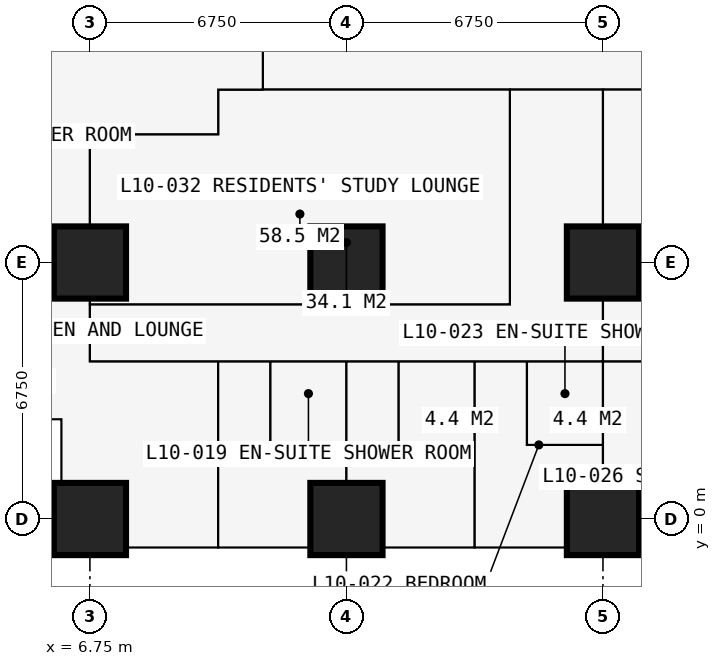
"""IFC4 building model, lengths in metres.
Left out: names, types, materials, properties, quantities, classifications, styles, units other than length and angle.
Written with IfcOpenShell. Run it as: python <this file> out.ifc"""

import sys

from ifc_helpers import new_model, si_unit, direction, frame, frame_2d, origin, origin_2d, place, context, subcontext, project, spatial, rectangle, extrude, element, fill, save


model = new_model("IFC4")
c1 = context("Model", 3, precision=1e-05, world=origin(), true_north=direction((0.0, 1.0)))
c2 = subcontext(c1, "Body", "Model", "MODEL_VIEW")
j1 = project(units=[si_unit("LENGTHUNIT", "METRE"), si_unit("PLANEANGLEUNIT", "RADIAN")], contexts=[c1])
p1 = place(None, origin())
s1 = spatial("IfcSite", under=j1, at=p1, CompositionType="ELEMENT")
p2 = place(p1, origin())
s2 = spatial("IfcBuilding", under=s1, at=p2, CompositionType="ELEMENT")
p3 = place(p2, frame((0.0, 0.0, 39.6)))
s3 = spatial("IfcBuildingStorey", under=s2, at=p3, CompositionType="ELEMENT", Elevation=39.6)
for number, where, z_axis, x_axis in (
    (1, (6.75, 0.0, 0.0), (0.0, 0.0, 1.0), (1.0, 0.0, 0.0)),
    (2, (6.75, 6.75, 0.0), (0.0, 0.0, 1.0), (1.0, 0.0, 0.0)),
    (3, (13.5, 0.0, 0.0), (0.0, 0.0, 1.0), (1.0, 0.0, 0.0)),
    (4, (13.5, 6.75, 0.0), (0.0, 0.0, 1.0), (1.0, 0.0, 0.0)),
    (5, (20.25, 0.0, 0.0), (0.0, 0.0, 1.0), (1.0, 0.0, 0.0)),
    (6, (20.25, 6.75, 0.0), (0.0, 0.0, 1.0), (1.0, 0.0, 0.0)),
):
    element("IfcColumn", number, at=place(p3, frame(where, z_axis=z_axis, x_axis=x_axis)), inside=s3, PredefinedType="COLUMN", context=c2, shape_type="SweptSolid", body=[
        extrude(rectangle(XDim=1.9, YDim=1.9, at=origin_2d()), origin(), (0.0, 0.0, 1.0), 3.6),
    ])
p4 = place(p3, frame((2.625, 2.625, 0.0), z_axis=(0.0, 0.0, 1.0), x_axis=(1.0, 0.0, 0.0)))
e7 = element("IfcWall", 7, at=p4, inside=s3, PredefinedType="SOLIDWALL", context=c2, shape_type="SweptSolid", body=[
    extrude(rectangle(XDim=3.375, YDim=0.3, at=frame_2d((1.688, 0.0))), origin(), (0.0, 0.0, 1.0), 3.375),
])
p5 = place(p4, frame((0.788, 0.0, 0.6)))
e8 = element("IfcOpeningElement", 8, at=p5, cuts=e7, PredefinedType="OPENING", context=c2, shape_type="SweptSolid", body=[
    extrude(rectangle(XDim=1.8, YDim=2.1, at=frame_2d((0.9, 1.05))), frame((0.0, 0.16, 0.0), z_axis=(0.0, -1.0, 0.0), x_axis=(1.0, 0.0, 0.0)), (0.0, 0.0, 1.0), 0.32),
])
p6 = place(p3, frame((6.0, 2.625, 0.0), z_axis=(0.0, 0.0, 1.0), x_axis=(0.0, -1.0, 0.0)))
e9 = element("IfcWall", 9, at=p6, inside=s3, PredefinedType="SOLIDWALL", context=c2, shape_type="SweptSolid", body=[
    extrude(rectangle(XDim=3.375, YDim=0.3, at=frame_2d((1.688, 0.0))), origin(), (0.0, 0.0, 1.0), 3.375),
])
p7 = place(p6, frame((0.317, 0.0, 0.9)))
e10 = element("IfcOpeningElement", 10, at=p7, cuts=e9, PredefinedType="OPENING", context=c2, shape_type="SweptSolid", body=[
    extrude(rectangle(XDim=1.2, YDim=1.8, at=frame_2d((0.6, 0.9))), frame((0.0, 0.16, 0.0), z_axis=(0.0, -1.0, 0.0), x_axis=(1.0, 0.0, 0.0)), (0.0, 0.0, 1.0), 0.32),
])
p8 = place(p3, frame((20.25, -0.75, 0.0), z_axis=(0.0, 0.0, 1.0), x_axis=(-1.0, 0.0, 0.0)))
e11 = element("IfcWall", 11, at=p8, inside=s3, PredefinedType="SOLIDWALL", context=c2, shape_type="SweptSolid", body=[
    extrude(rectangle(XDim=6.75, YDim=0.15, at=frame_2d((3.375, 0.0))), origin(), (0.0, 0.0, 1.0), 3.375),
])
p9 = place(p8, frame((0.996, 0.0, 0.0)))
e12 = element("IfcOpeningElement", 12, at=p9, cuts=e11, PredefinedType="OPENING", context=c2, shape_type="SweptSolid", body=[
    extrude(rectangle(XDim=1.0, YDim=2.2, at=frame_2d((0.5, 1.1))), frame((0.0, 0.085, 0.0), z_axis=(0.0, -1.0, 0.0), x_axis=(1.0, 0.0, 0.0)), (0.0, 0.0, 1.0), 0.17),
])
p10 = place(p8, frame((2.042, 0.0, 0.9)))
e13 = element("IfcOpeningElement", 13, at=p10, cuts=e11, PredefinedType="OPENING", context=c2, shape_type="SweptSolid", body=[
    extrude(rectangle(XDim=1.2, YDim=1.8, at=frame_2d((0.6, 0.9))), frame((0.0, 0.085, 0.0), z_axis=(0.0, -1.0, 0.0), x_axis=(1.0, 0.0, 0.0)), (0.0, 0.0, 1.0), 0.17),
])
p11 = place(p8, frame((4.754, 0.0, 0.0)))
e14 = element("IfcOpeningElement", 14, at=p11, cuts=e11, PredefinedType="OPENING", context=c2, shape_type="SweptSolid", body=[
    extrude(rectangle(XDim=1.0, YDim=2.2, at=frame_2d((0.5, 1.1))), frame((0.0, 0.085, 0.0), z_axis=(0.0, -1.0, 0.0), x_axis=(1.0, 0.0, 0.0)), (0.0, 0.0, 1.0), 0.17),
])
p12 = place(p8, frame((3.508, 0.0, 0.9)))
e15 = element("IfcOpeningElement", 15, at=p12, cuts=e11, PredefinedType="OPENING", context=c2, shape_type="SweptSolid", body=[
    extrude(rectangle(XDim=1.2, YDim=1.8, at=frame_2d((0.6, 0.9))), frame((0.0, 0.085, 0.0), z_axis=(0.0, -1.0, 0.0), x_axis=(1.0, 0.0, 0.0)), (0.0, 0.0, 1.0), 0.17),
])
p13 = place(p3, frame((16.875, -0.85, 0.0), z_axis=(0.0, 0.0, 1.0), x_axis=(0.0, -1.0, 0.0)))
e16 = element("IfcWall", 16, at=p13, inside=s3, PredefinedType="USERDEFINED", context=c2, shape_type="SweptSolid", body=[
    extrude(rectangle(XDim=2.2, YDim=1.0, at=frame_2d((1.1, 0.0))), origin(), (0.0, 0.0, 1.0), 0.9),
])
p14 = place(p3, frame((-0.734, 10.125, 0.0), z_axis=(0.0, 0.0, 1.0), x_axis=(1.0, 0.0, 0.0)))
e17 = element("IfcWall", 17, at=p14, inside=s3, PredefinedType="PARTITIONING", context=c2, shape_type="SweptSolid", body=[
    extrude(rectangle(XDim=10.859, YDim=0.15, at=frame_2d((5.429, 0.0))), origin(), (0.0, 0.0, 1.0), 3.375),
])
p15 = place(p3, frame((6.75, 4.15, 0.0), z_axis=(0.0, 0.0, 1.0), x_axis=(0.0, 1.0, 0.0)))
e18 = element("IfcWall", 18, at=p15, inside=s3, PredefinedType="PARTITIONING", context=c2, shape_type="SweptSolid", body=[
    extrude(rectangle(XDim=5.975, YDim=0.15, at=frame_2d((2.988, 0.0))), origin(), (0.0, 0.0, 1.0), 2.877),
])
p16 = place(p3, frame((6.75, 4.15, 0.0), z_axis=(0.0, 0.0, 1.0), x_axis=(1.0, 0.0, 0.0)))
e19 = element("IfcWall", 19, at=p16, inside=s3, PredefinedType="PARTITIONING", context=c2, shape_type="SweptSolid", body=[
    extrude(rectangle(XDim=23.625, YDim=0.1, at=frame_2d((11.812, 0.0))), origin(), (0.0, 0.0, 1.0), 3.375),
])
p17 = place(p16, frame((1.2, 0.0, 0.0)))
e20 = element("IfcOpeningElement", 20, at=p17, cuts=e19, PredefinedType="OPENING", context=c2, shape_type="SweptSolid", body=[
    extrude(rectangle(XDim=1.0, YDim=2.2, at=frame_2d((0.5, 1.1))), frame((0.0, 0.06, 0.0), z_axis=(0.0, -1.0, 0.0), x_axis=(1.0, 0.0, 0.0)), (0.0, 0.0, 1.0), 0.12),
])
p18 = place(p16, frame((3.575, 0.0, 0.0)))
e21 = element("IfcOpeningElement", 21, at=p18, cuts=e19, PredefinedType="OPENING", context=c2, shape_type="SweptSolid", body=[
    extrude(rectangle(XDim=0.95, YDim=2.2, at=frame_2d((0.475, 1.1))), frame((0.0, 0.06, 0.0), z_axis=(0.0, -1.0, 0.0), x_axis=(1.0, 0.0, 0.0)), (0.0, 0.0, 1.0), 0.12),
])
p19 = place(p16, frame((7.0, 0.0, 0.0)))
e22 = element("IfcOpeningElement", 22, at=p19, cuts=e19, PredefinedType="OPENING", context=c2, shape_type="SweptSolid", body=[
    extrude(rectangle(XDim=0.95, YDim=2.2, at=frame_2d((0.475, 1.1))), frame((0.0, 0.06, 0.0), z_axis=(0.0, -1.0, 0.0), x_axis=(1.0, 0.0, 0.0)), (0.0, 0.0, 1.0), 0.12),
])
p20 = place(p16, frame((10.375, 0.0, 0.0)))
e23 = element("IfcOpeningElement", 23, at=p20, cuts=e19, PredefinedType="OPENING", context=c2, shape_type="SweptSolid", body=[
    extrude(rectangle(XDim=0.95, YDim=2.2, at=frame_2d((0.475, 1.1))), frame((0.0, 0.06, 0.0), z_axis=(0.0, -1.0, 0.0), x_axis=(1.0, 0.0, 0.0)), (0.0, 0.0, 1.0), 0.12),
])
p21 = place(p16, frame((13.7, 0.0, 0.0)))
e24 = element("IfcOpeningElement", 24, at=p21, cuts=e19, PredefinedType="OPENING", context=c2, shape_type="SweptSolid", body=[
    extrude(rectangle(XDim=0.95, YDim=2.2, at=frame_2d((0.475, 1.1))), frame((0.0, 0.06, 0.0), z_axis=(0.0, -1.0, 0.0), x_axis=(1.0, 0.0, 0.0)), (0.0, 0.0, 1.0), 0.12),
])
p22 = place(p16, frame((17.125, 0.0, 0.0)))
e25 = element("IfcOpeningElement", 25, at=p22, cuts=e19, PredefinedType="OPENING", context=c2, shape_type="SweptSolid", body=[
    extrude(rectangle(XDim=0.95, YDim=2.2, at=frame_2d((0.475, 1.1))), frame((0.0, 0.06, 0.0), z_axis=(0.0, -1.0, 0.0), x_axis=(1.0, 0.0, 0.0)), (0.0, 0.0, 1.0), 0.12),
])
p23 = place(p16, frame((20.5, 0.0, 0.0)))
e26 = element("IfcOpeningElement", 26, at=p23, cuts=e19, PredefinedType="OPENING", context=c2, shape_type="SweptSolid", body=[
    extrude(rectangle(XDim=0.95, YDim=2.2, at=frame_2d((0.475, 1.1))), frame((0.0, 0.06, 0.0), z_axis=(0.0, -1.0, 0.0), x_axis=(1.0, 0.0, 0.0)), (0.0, 0.0, 1.0), 0.12),
])
p24 = place(p3, frame((6.75, 5.65, 0.0), z_axis=(0.0, 0.0, 1.0), x_axis=(1.0, 0.0, 0.0)))
e27 = element("IfcWall", 27, at=p24, inside=s3, PredefinedType="PARTITIONING", context=c2, shape_type="SweptSolid", body=[
    extrude(rectangle(XDim=11.05, YDim=0.15, at=frame_2d((5.525, 0.0))), origin(), (0.0, 0.0, 1.0), 3.375),
])
p25 = place(p3, frame((10.125, -0.734, 0.0), z_axis=(0.0, 0.0, 1.0), x_axis=(0.0, 1.0, 0.0)))
e28 = element("IfcWall", 28, at=p25, inside=s3, PredefinedType="PARTITIONING", context=c2, shape_type="SweptSolid", body=[
    extrude(rectangle(XDim=4.884, YDim=0.15, at=frame_2d((2.442, 0.0))), origin(), (0.0, 0.0, 1.0), 3.375),
])
p26 = place(p3, frame((10.125, 10.125, 0.0), z_axis=(0.0, 0.0, 1.0), x_axis=(0.0, 1.0, 0.0)))
e29 = element("IfcWall", 29, at=p26, inside=s3, PredefinedType="PARTITIONING", context=c2, shape_type="SweptSolid", body=[
    extrude(rectangle(XDim=1.175, YDim=0.15, at=frame_2d((0.587, 0.0))), origin(), (0.0, 0.0, 1.0), 3.375),
])
p27 = place(p3, frame((10.125, 11.3, 0.0), z_axis=(0.0, 0.0, 1.0), x_axis=(1.0, 0.0, 0.0)))
e30 = element("IfcWall", 30, at=p27, inside=s3, PredefinedType="PARTITIONING", context=c2, shape_type="SweptSolid", body=[
    extrude(rectangle(XDim=20.675, YDim=0.15, at=frame_2d((10.337, 0.0))), origin(), (0.0, 0.0, 1.0), 3.375),
])
p28 = place(p27, frame((8.375, 0.0, 0.0)))
e31 = element("IfcOpeningElement", 31, at=p28, cuts=e30, PredefinedType="OPENING", context=c2, shape_type="SweptSolid", body=[
    extrude(rectangle(XDim=1.0, YDim=2.2, at=frame_2d((0.5, 1.1))), frame((0.0, 0.085, 0.0), z_axis=(0.0, -1.0, 0.0), x_axis=(1.0, 0.0, 0.0)), (0.0, 0.0, 1.0), 0.17),
])
p29 = place(p27, frame((10.975, 0.0, 0.0)))
e32 = element("IfcOpeningElement", 32, at=p29, cuts=e30, PredefinedType="OPENING", context=c2, shape_type="SweptSolid", body=[
    extrude(rectangle(XDim=1.0, YDim=2.2, at=frame_2d((0.5, 1.1))), frame((0.0, 0.085, 0.0), z_axis=(0.0, -1.0, 0.0), x_axis=(1.0, 0.0, 0.0)), (0.0, 0.0, 1.0), 0.17),
])
p30 = place(p27, frame((3.925, 0.0, 0.0)))
e33 = element("IfcOpeningElement", 33, at=p30, cuts=e30, PredefinedType="OPENING", context=c2, shape_type="SweptSolid", body=[
    extrude(rectangle(XDim=0.95, YDim=2.2, at=frame_2d((0.475, 1.1))), frame((0.0, 0.085, 0.0), z_axis=(0.0, -1.0, 0.0), x_axis=(1.0, 0.0, 0.0)), (0.0, 0.0, 1.0), 0.17),
])
p31 = place(p3, frame((11.3, 11.3, 0.0), z_axis=(0.0, 0.0, 1.0), x_axis=(0.0, 1.0, 0.0)))
e34 = element("IfcWall", 34, at=p31, inside=s3, PredefinedType="PARTITIONING", context=c2, shape_type="SweptSolid", body=[
    extrude(rectangle(XDim=19.075, YDim=0.15, at=frame_2d((9.538, 0.0))), origin(), (0.0, 0.0, 1.0), 3.375),
])
p32 = place(p31, frame((10.137, 0.0, 0.0)))
e35 = element("IfcOpeningElement", 35, at=p32, cuts=e34, PredefinedType="OPENING", context=c2, shape_type="SweptSolid", body=[
    extrude(rectangle(XDim=1.0, YDim=2.2, at=frame_2d((0.5, 1.1))), frame((0.0, 0.085, 0.0), z_axis=(0.0, -1.0, 0.0), x_axis=(1.0, 0.0, 0.0)), (0.0, 0.0, 1.0), 0.17),
])
p33 = place(p3, frame((11.5, 1.95, 0.0), z_axis=(0.0, 0.0, 1.0), x_axis=(0.0, 1.0, 0.0)))
e36 = element("IfcWall", 36, at=p33, inside=s3, PredefinedType="PARTITIONING", context=c2, shape_type="SweptSolid", body=[
    extrude(rectangle(XDim=2.2, YDim=0.1, at=frame_2d((1.1, 0.0))), origin(), (0.0, 0.0, 1.0), 3.375),
])
p34 = place(p33, frame((0.65, 0.0, 0.0)))
e37 = element("IfcOpeningElement", 37, at=p34, cuts=e36, PredefinedType="OPENING", context=c2, shape_type="SweptSolid", body=[
    extrude(rectangle(XDim=0.9, YDim=2.2, at=frame_2d((0.45, 1.1))), frame((0.0, 0.06, 0.0), z_axis=(0.0, -1.0, 0.0), x_axis=(1.0, 0.0, 0.0)), (0.0, 0.0, 1.0), 0.12),
])
p35 = place(p3, frame((11.5, 1.95, 0.0), z_axis=(0.0, 0.0, 1.0), x_axis=(1.0, 0.0, 0.0)))
e38 = element("IfcWall", 38, at=p35, inside=s3, PredefinedType="PARTITIONING", context=c2, shape_type="SweptSolid", body=[
    extrude(rectangle(XDim=2.0, YDim=0.1, at=frame_2d((1.0, 0.0))), origin(), (0.0, 0.0, 1.0), 3.375),
])
p36 = place(p3, frame((13.5, -0.734, 0.0), z_axis=(0.0, 0.0, 1.0), x_axis=(0.0, 1.0, 0.0)))
e39 = element("IfcWall", 39, at=p36, inside=s3, PredefinedType="PARTITIONING", context=c2, shape_type="SweptSolid", body=[
    extrude(rectangle(XDim=4.884, YDim=0.175, at=frame_2d((2.442, 0.0))), origin(), (0.0, 0.0, 1.0), 2.877),
])
p37 = place(p3, frame((14.875, 1.95, 0.0), z_axis=(0.0, 0.0, 1.0), x_axis=(0.0, 1.0, 0.0)))
e40 = element("IfcWall", 40, at=p37, inside=s3, PredefinedType="PARTITIONING", context=c2, shape_type="SweptSolid", body=[
    extrude(rectangle(XDim=2.2, YDim=0.1, at=frame_2d((1.1, 0.0))), origin(), (0.0, 0.0, 1.0), 3.375),
])
p38 = place(p37, frame((0.65, 0.0, 0.0)))
e41 = element("IfcOpeningElement", 41, at=p38, cuts=e40, PredefinedType="OPENING", context=c2, shape_type="SweptSolid", body=[
    extrude(rectangle(XDim=0.9, YDim=2.2, at=frame_2d((0.45, 1.1))), frame((0.0, 0.06, 0.0), z_axis=(0.0, -1.0, 0.0), x_axis=(1.0, 0.0, 0.0)), (0.0, 0.0, 1.0), 0.12),
])
p39 = place(p3, frame((14.875, 1.95, 0.0), z_axis=(0.0, 0.0, 1.0), x_axis=(1.0, 0.0, 0.0)))
e42 = element("IfcWall", 42, at=p39, inside=s3, PredefinedType="PARTITIONING", context=c2, shape_type="SweptSolid", body=[
    extrude(rectangle(XDim=2.0, YDim=0.1, at=frame_2d((1.0, 0.0))), origin(), (0.0, 0.0, 1.0), 3.375),
])
p40 = place(p3, frame((16.875, -0.734, 0.0), z_axis=(0.0, 0.0, 1.0), x_axis=(0.0, 1.0, 0.0)))
e43 = element("IfcWall", 43, at=p40, inside=s3, PredefinedType="PARTITIONING", context=c2, shape_type="SweptSolid", body=[
    extrude(rectangle(XDim=4.884, YDim=0.175, at=frame_2d((2.442, 0.0))), origin(), (0.0, 0.0, 1.0), 3.375),
])
p41 = place(p3, frame((17.8, 5.65, 0.0), z_axis=(0.0, 0.0, 1.0), x_axis=(0.0, 1.0, 0.0)))
e44 = element("IfcWall", 44, at=p41, inside=s3, PredefinedType="PARTITIONING", context=c2, shape_type="SweptSolid", body=[
    extrude(rectangle(XDim=5.65, YDim=0.15, at=frame_2d((2.825, 0.0))), origin(), (0.0, 0.0, 1.0), 3.375),
])
p42 = place(p3, frame((18.25, 1.95, 0.0), z_axis=(0.0, 0.0, 1.0), x_axis=(0.0, 1.0, 0.0)))
e45 = element("IfcWall", 45, at=p42, inside=s3, PredefinedType="PARTITIONING", context=c2, shape_type="SweptSolid", body=[
    extrude(rectangle(XDim=2.2, YDim=0.1, at=frame_2d((1.1, 0.0))), origin(), (0.0, 0.0, 1.0), 3.375),
])
p43 = place(p42, frame((0.65, 0.0, 0.0)))
e46 = element("IfcOpeningElement", 46, at=p43, cuts=e45, PredefinedType="OPENING", context=c2, shape_type="SweptSolid", body=[
    extrude(rectangle(XDim=0.9, YDim=2.2, at=frame_2d((0.45, 1.1))), frame((0.0, 0.06, 0.0), z_axis=(0.0, -1.0, 0.0), x_axis=(1.0, 0.0, 0.0)), (0.0, 0.0, 1.0), 0.12),
])
p44 = place(p3, frame((18.25, 1.95, 0.0), z_axis=(0.0, 0.0, 1.0), x_axis=(1.0, 0.0, 0.0)))
e47 = element("IfcWall", 47, at=p44, inside=s3, PredefinedType="PARTITIONING", context=c2, shape_type="SweptSolid", body=[
    extrude(rectangle(XDim=2.0, YDim=0.1, at=frame_2d((1.0, 0.0))), origin(), (0.0, 0.0, 1.0), 3.375),
])
p45 = place(p3, frame((20.25, -0.734, 0.0), z_axis=(0.0, 0.0, 1.0), x_axis=(0.0, 1.0, 0.0)))
e48 = element("IfcWall", 48, at=p45, inside=s3, PredefinedType="PARTITIONING", context=c2, shape_type="SweptSolid", body=[
    extrude(rectangle(XDim=12.034, YDim=0.15, at=frame_2d((6.017, 0.0))), origin(), (0.0, 0.0, 1.0), 2.61),
])
p46 = place(p7, origin())
e49 = element("IfcWindow", 49, at=p46, inside=s3, PartitioningType="SINGLE_PANEL", PredefinedType="WINDOW", context=c2, shape_type="SweptSolid", body=[
    extrude(rectangle(XDim=1.2, YDim=1.8, at=frame_2d((0.6, 0.9))), frame((0.0, 0.03, 0.0), z_axis=(0.0, -1.0, 0.0), x_axis=(1.0, 0.0, 0.0)), (0.0, 0.0, 1.0), 0.06),
])
fill(e10, e49)
p47 = place(p9, origin())
e50 = element("IfcDoor", 50, at=p47, inside=s3, OperationType="SINGLE_SWING_LEFT", PredefinedType="DOOR", context=c2, shape_type="SweptSolid", body=[
    extrude(rectangle(XDim=1.0, YDim=2.2, at=frame_2d((0.5, 1.1))), frame((0.0, 0.025, 0.0), z_axis=(0.0, -1.0, 0.0), x_axis=(1.0, 0.0, 0.0)), (0.0, 0.0, 1.0), 0.05),
])
fill(e12, e50)
p48 = place(p10, origin())
e51 = element("IfcWindow", 51, at=p48, inside=s3, PartitioningType="SINGLE_PANEL", PredefinedType="WINDOW", context=c2, shape_type="SweptSolid", body=[
    extrude(rectangle(XDim=1.2, YDim=1.8, at=frame_2d((0.6, 0.9))), frame((0.0, 0.03, 0.0), z_axis=(0.0, -1.0, 0.0), x_axis=(1.0, 0.0, 0.0)), (0.0, 0.0, 1.0), 0.06),
])
fill(e13, e51)
p49 = place(p11, origin())
e52 = element("IfcDoor", 52, at=p49, inside=s3, OperationType="SINGLE_SWING_RIGHT", PredefinedType="DOOR", context=c2, shape_type="SweptSolid", body=[
    extrude(rectangle(XDim=1.0, YDim=2.2, at=frame_2d((0.5, 1.1))), frame((0.0, 0.025, 0.0), z_axis=(0.0, -1.0, 0.0), x_axis=(1.0, 0.0, 0.0)), (0.0, 0.0, 1.0), 0.05),
])
fill(e14, e52)
p50 = place(p12, origin())
e53 = element("IfcWindow", 53, at=p50, inside=s3, PartitioningType="SINGLE_PANEL", PredefinedType="WINDOW", context=c2, shape_type="SweptSolid", body=[
    extrude(rectangle(XDim=1.2, YDim=1.8, at=frame_2d((0.6, 0.9))), frame((0.0, 0.03, 0.0), z_axis=(0.0, -1.0, 0.0), x_axis=(1.0, 0.0, 0.0)), (0.0, 0.0, 1.0), 0.06),
])
fill(e15, e53)
p51 = place(p17, origin())
e54 = element("IfcDoor", 54, at=p51, inside=s3, OperationType="SINGLE_SWING_LEFT", PredefinedType="DOOR", context=c2, shape_type="SweptSolid", body=[
    extrude(rectangle(XDim=1.0, YDim=2.2, at=frame_2d((0.5, 1.1))), frame((0.0, 0.025, 0.0), z_axis=(0.0, -1.0, 0.0), x_axis=(1.0, 0.0, 0.0)), (0.0, 0.0, 1.0), 0.05),
])
fill(e20, e54)
p52 = place(p18, origin())
e55 = element("IfcDoor", 55, at=p52, inside=s3, OperationType="SINGLE_SWING_LEFT", PredefinedType="DOOR", context=c2, shape_type="SweptSolid", body=[
    extrude(rectangle(XDim=0.95, YDim=2.2, at=frame_2d((0.475, 1.1))), frame((0.0, 0.025, 0.0), z_axis=(0.0, -1.0, 0.0), x_axis=(1.0, 0.0, 0.0)), (0.0, 0.0, 1.0), 0.05),
])
fill(e21, e55)
p53 = place(p34, origin())
e56 = element("IfcDoor", 56, at=p53, inside=s3, OperationType="SINGLE_SWING_RIGHT", PredefinedType="DOOR", context=c2, shape_type="SweptSolid", body=[
    extrude(rectangle(XDim=0.9, YDim=2.2, at=frame_2d((0.45, 1.1))), frame((0.0, 0.025, 0.0), z_axis=(0.0, -1.0, 0.0), x_axis=(1.0, 0.0, 0.0)), (0.0, 0.0, 1.0), 0.05),
])
fill(e37, e56)
p54 = place(p19, origin())
e57 = element("IfcDoor", 57, at=p54, inside=s3, OperationType="SINGLE_SWING_LEFT", PredefinedType="DOOR", context=c2, shape_type="SweptSolid", body=[
    extrude(rectangle(XDim=0.95, YDim=2.2, at=frame_2d((0.475, 1.1))), frame((0.0, 0.025, 0.0), z_axis=(0.0, -1.0, 0.0), x_axis=(1.0, 0.0, 0.0)), (0.0, 0.0, 1.0), 0.05),
])
fill(e22, e57)
p55 = place(p38, origin())
e58 = element("IfcDoor", 58, at=p55, inside=s3, OperationType="SINGLE_SWING_RIGHT", PredefinedType="DOOR", context=c2, shape_type="SweptSolid", body=[
    extrude(rectangle(XDim=0.9, YDim=2.2, at=frame_2d((0.45, 1.1))), frame((0.0, 0.025, 0.0), z_axis=(0.0, -1.0, 0.0), x_axis=(1.0, 0.0, 0.0)), (0.0, 0.0, 1.0), 0.05),
])
fill(e41, e58)
p56 = place(p20, origin())
e59 = element("IfcDoor", 59, at=p56, inside=s3, OperationType="SINGLE_SWING_LEFT", PredefinedType="DOOR", context=c2, shape_type="SweptSolid", body=[
    extrude(rectangle(XDim=0.95, YDim=2.2, at=frame_2d((0.475, 1.1))), frame((0.0, 0.025, 0.0), z_axis=(0.0, -1.0, 0.0), x_axis=(1.0, 0.0, 0.0)), (0.0, 0.0, 1.0), 0.05),
])
fill(e23, e59)
p57 = place(p43, origin())
e60 = element("IfcDoor", 60, at=p57, inside=s3, OperationType="SINGLE_SWING_RIGHT", PredefinedType="DOOR", context=c2, shape_type="SweptSolid", body=[
    extrude(rectangle(XDim=0.9, YDim=2.2, at=frame_2d((0.45, 1.1))), frame((0.0, 0.025, 0.0), z_axis=(0.0, -1.0, 0.0), x_axis=(1.0, 0.0, 0.0)), (0.0, 0.0, 1.0), 0.05),
])
fill(e46, e60)
p58 = place(p28, origin())
e61 = element("IfcDoor", 61, at=p58, inside=s3, OperationType="SINGLE_SWING_LEFT", PredefinedType="DOOR", context=c2, shape_type="SweptSolid", body=[
    extrude(rectangle(XDim=1.0, YDim=2.2, at=frame_2d((0.5, 1.1))), frame((0.0, 0.025, 0.0), z_axis=(0.0, -1.0, 0.0), x_axis=(1.0, 0.0, 0.0)), (0.0, 0.0, 1.0), 0.05),
])
fill(e31, e61)
p59 = place(p21, origin())
e62 = element("IfcDoor", 62, at=p59, inside=s3, OperationType="SINGLE_SWING_LEFT", PredefinedType="DOOR", context=c2, shape_type="SweptSolid", body=[
    extrude(rectangle(XDim=0.95, YDim=2.2, at=frame_2d((0.475, 1.1))), frame((0.0, 0.025, 0.0), z_axis=(0.0, -1.0, 0.0), x_axis=(1.0, 0.0, 0.0)), (0.0, 0.0, 1.0), 0.05),
])
fill(e24, e62)
p60 = place(p29, origin())
e63 = element("IfcDoor", 63, at=p60, inside=s3, OperationType="SINGLE_SWING_LEFT", PredefinedType="DOOR", context=c2, shape_type="SweptSolid", body=[
    extrude(rectangle(XDim=1.0, YDim=2.2, at=frame_2d((0.5, 1.1))), frame((0.0, 0.025, 0.0), z_axis=(0.0, -1.0, 0.0), x_axis=(1.0, 0.0, 0.0)), (0.0, 0.0, 1.0), 0.05),
])
fill(e32, e63)
p61 = place(p30, origin())
e64 = element("IfcDoor", 64, at=p61, inside=s3, OperationType="SINGLE_SWING_LEFT", PredefinedType="DOOR", context=c2, shape_type="SweptSolid", body=[
    extrude(rectangle(XDim=0.95, YDim=2.2, at=frame_2d((0.475, 1.1))), frame((0.0, 0.025, 0.0), z_axis=(0.0, -1.0, 0.0), x_axis=(1.0, 0.0, 0.0)), (0.0, 0.0, 1.0), 0.05),
])
fill(e33, e64)
save(model, sys.argv[1])
